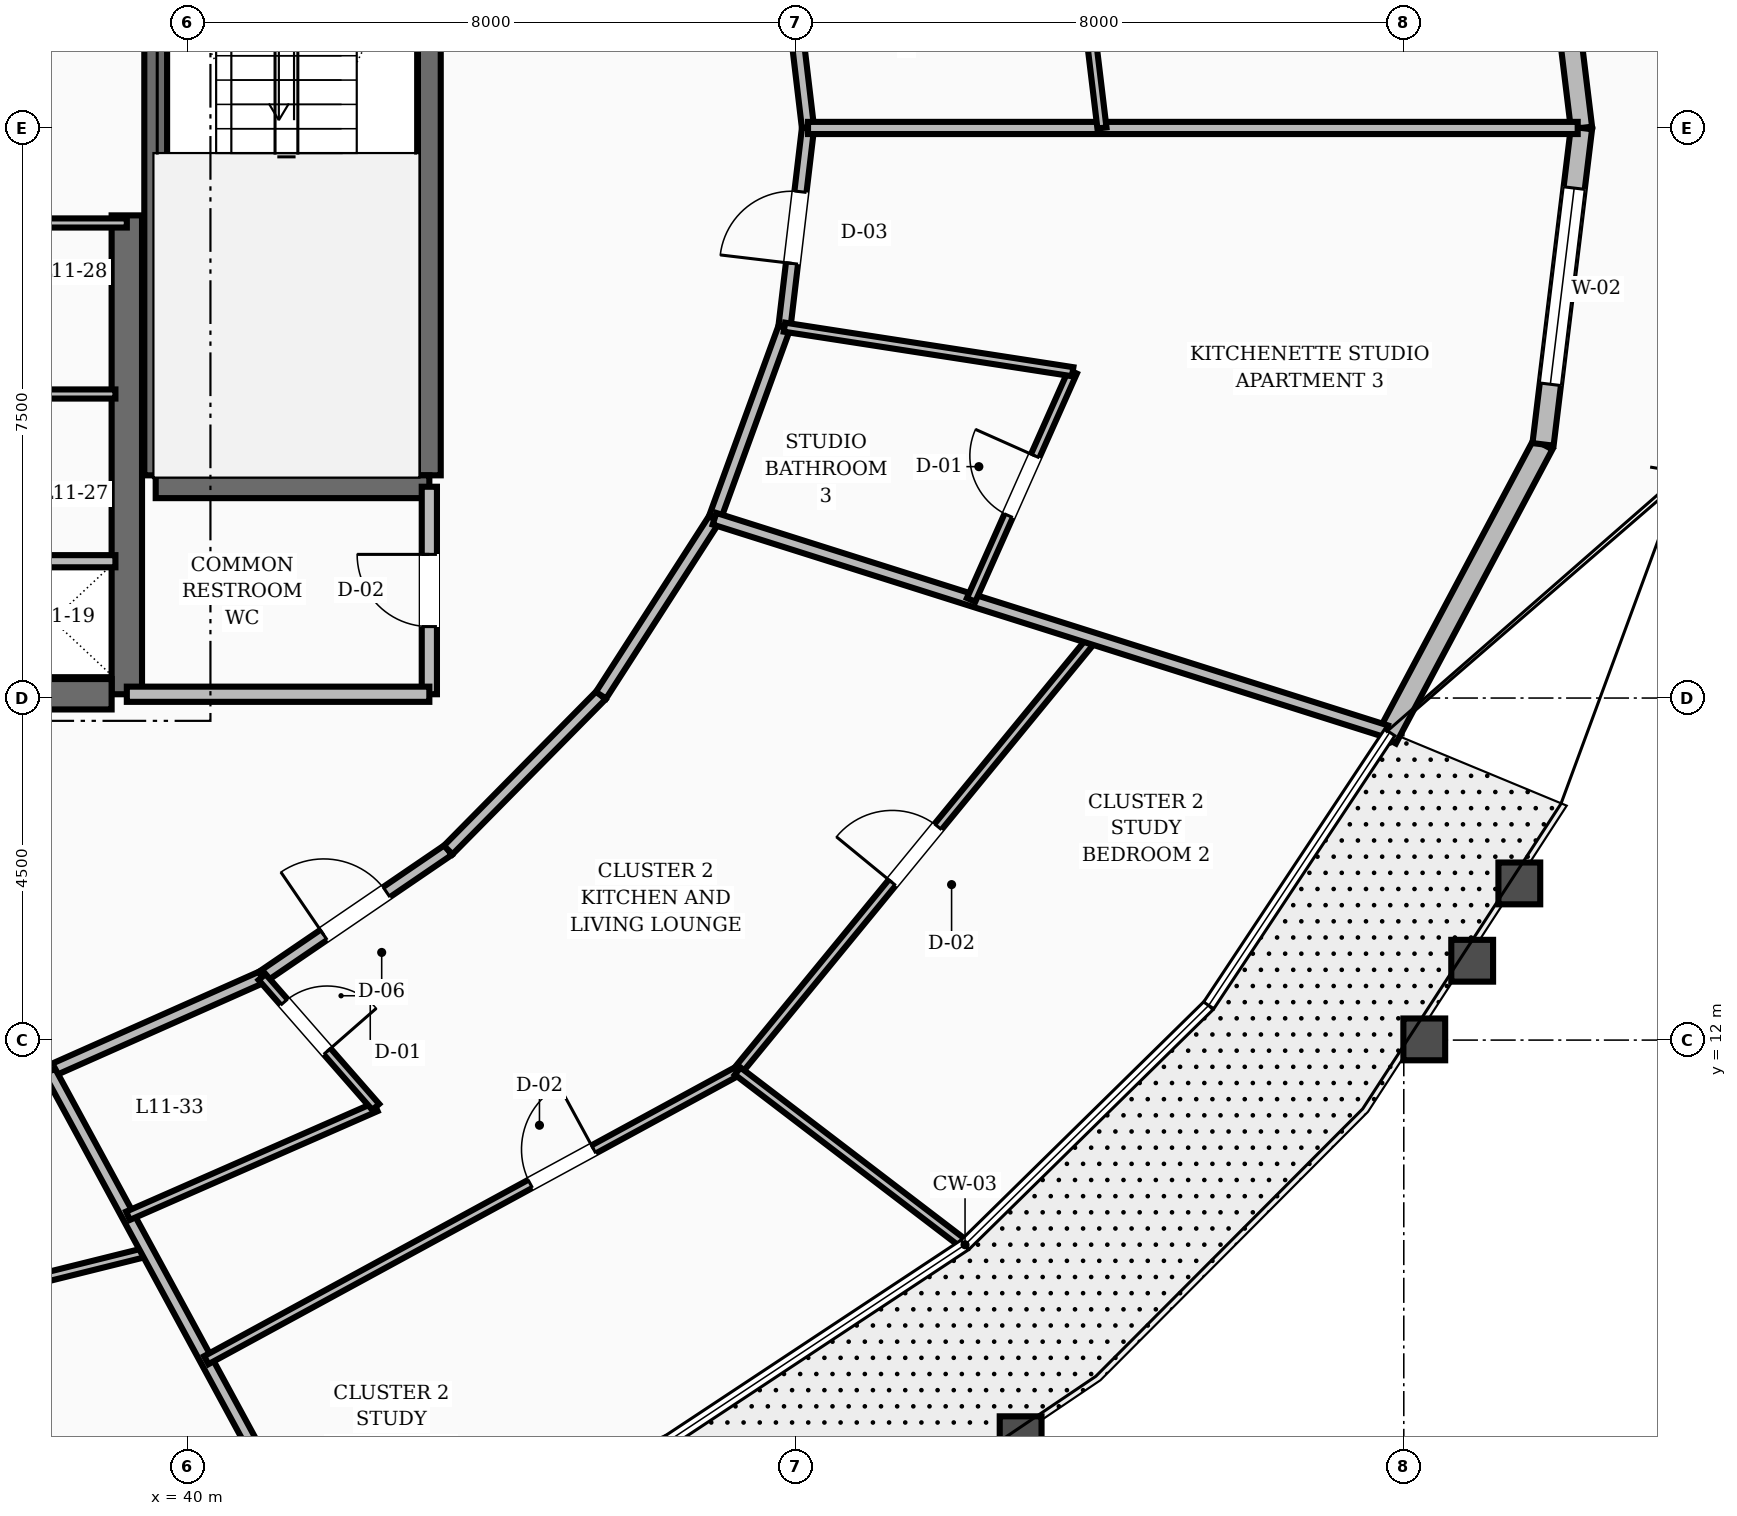
"""IFC4 building model, lengths in metres.
Left out: names, types, materials, properties, quantities, classifications, styles, units other than length and angle.
Written with IfcOpenShell. Run it as: python <this file> out.ifc"""

import sys

from ifc_helpers import new_model, si_unit, direction, frame, frame_2d, origin, place, context, subcontext, project, spatial, rectangle, extrude, element, fill, save


model = new_model("IFC4")
c1 = context("Model", 3, precision=1e-05, world=origin(), true_north=direction((0.0, 1.0)))
c2 = subcontext(c1, "Body", "Model", "MODEL_VIEW")
j1 = project(units=[si_unit("LENGTHUNIT", "METRE"), si_unit("PLANEANGLEUNIT", "RADIAN")], contexts=[c1])
p1 = place(None, origin())
s1 = spatial("IfcSite", under=j1, at=p1, CompositionType="ELEMENT")
p2 = place(p1, origin())
s2 = spatial("IfcBuilding", under=s1, at=p2, CompositionType="ELEMENT")
p3 = place(p2, frame((0.0, 0.0, 48.4)))
s3 = spatial("IfcBuildingStorey", under=s2, at=p3, CompositionType="ELEMENT", Elevation=48.4)
p4 = place(p3, frame((39.2, 16.55, 0.0), z_axis=(0.0, 0.0, 1.0), x_axis=(0.0, 1.0, 0.0)))
e1 = element("IfcWall", 1, at=p4, inside=s3, PredefinedType="SHEAR", context=c2, shape_type="SweptSolid", body=[
    extrude(rectangle(XDim=6.3, YDim=0.4, at=frame_2d((3.15, 0.0))), origin(), (0.0, 0.0, 1.0), 3.6),
])
p5 = place(p3, frame((35.8, 16.55, 0.0), z_axis=(0.0, 0.0, 1.0), x_axis=(1.0, 0.0, 0.0)))
e2 = element("IfcWall", 2, at=p5, inside=s3, PredefinedType="SHEAR", context=c2, shape_type="SweptSolid", body=[
    extrude(rectangle(XDim=3.2, YDim=0.4, at=frame_2d((1.6, 0.0))), origin(), (0.0, 0.0, 1.0), 3.6),
])
p6 = place(p5, frame((0.3, 0.0, 0.0)))
e3 = element("IfcOpeningElement", 3, at=p6, cuts=e2, PredefinedType="OPENING", context=c2, shape_type="SweptSolid", body=[
    extrude(rectangle(XDim=1.1, YDim=2.1, at=frame_2d((0.55, 1.05))), frame((0.0, 0.21, 0.0), z_axis=(0.0, -1.0, 0.0), x_axis=(1.0, 0.0, 0.0)), (0.0, 0.0, 1.0), 0.42),
])
for number, where, z_axis, x_axis in (
    (4, (43.18, 19.43, 0.0), (0.0, 0.0, 1.0), (0.0, 1.0, 0.0)),
    (5, (39.58, 19.43, 0.0), (0.0, 0.0, 1.0), (0.0, 1.0, 0.0)),
):
    element("IfcWall", number, at=place(p3, frame(where, z_axis=z_axis, x_axis=x_axis)), inside=s3, PredefinedType="SHEAR", context=c2, shape_type="SweptSolid", body=[
        extrude(rectangle(XDim=8.74, YDim=0.3, at=frame_2d((4.37, 0.0))), origin(), (0.0, 0.0, 1.0), 3.6),
    ])
p7 = place(p3, frame((39.58, 19.28, 0.0), z_axis=(0.0, 0.0, 1.0), x_axis=(1.0, 0.0, 0.0)))
e6 = element("IfcWall", 6, at=p7, inside=s3, PredefinedType="SHEAR", context=c2, shape_type="SweptSolid", body=[
    extrude(rectangle(XDim=3.6, YDim=0.3, at=frame_2d((1.8, 0.0))), origin(), (0.0, 0.0, 1.0), 3.6),
])
p8 = place(p3, frame((58.338, 24.0, 0.0), z_axis=(0.0, 0.0, 1.0), x_axis=(-0.120687785898, 0.992690514881, 0.0)))
e7 = element("IfcWall", 7, at=p8, inside=s3, PredefinedType="STANDARD", context=c2, shape_type="SweptSolid", body=[
    extrude(rectangle(XDim=4.194, YDim=0.28, at=frame_2d((2.097, 0.0))), origin(), (0.0, 0.0, 1.0), 2.65),
])
p9 = place(p3, frame((55.773, 15.967, 0.0), z_axis=(0.0, 0.0, 1.0), x_axis=(0.469726578594, 0.882811951303, 0.0)))
e8 = element("IfcWall", 8, at=p9, inside=s3, PredefinedType="STANDARD", context=c2, shape_type="SweptSolid", body=[
    extrude(rectangle(XDim=4.384, YDim=0.28, at=frame_2d((2.192, 0.0))), origin(), (0.0, 0.0, 1.0), 2.65),
])
p10 = place(p3, frame((57.832, 19.837, 0.0), z_axis=(0.0, 0.0, 1.0), x_axis=(0.120687785898, 0.992690514881, 0.0)))
e9 = element("IfcWall", 9, at=p10, inside=s3, PredefinedType="STANDARD", context=c2, shape_type="SweptSolid", body=[
    extrude(rectangle(XDim=4.194, YDim=0.28, at=frame_2d((2.097, 0.0))), origin(), (0.0, 0.0, 1.0), 2.65),
])
p11 = place(p10, frame((0.797, 0.0, 0.8)))
e10 = element("IfcOpeningElement", 10, at=p11, cuts=e9, PredefinedType="OPENING", context=c2, shape_type="SweptSolid", body=[
    extrude(rectangle(XDim=2.6, YDim=1.65, at=frame_2d((1.3, 0.825))), frame((0.0, 0.15, 0.0), z_axis=(0.0, -1.0, 0.0), x_axis=(1.0, 0.0, 0.0)), (0.0, 0.0, 1.0), 0.3),
])
p12 = place(p3, frame((43.18, 16.55, 0.0), z_axis=(0.0, 0.0, 1.0), x_axis=(0.0, 1.0, 0.0)))
e11 = element("IfcWall", 11, at=p12, inside=s3, PredefinedType="SOLIDWALL", context=c2, shape_type="SweptSolid", body=[
    extrude(rectangle(XDim=2.73, YDim=0.2, at=frame_2d((1.365, 0.0))), origin(), (0.0, 0.0, 1.0), 2.61),
])
p13 = place(p12, frame((0.89, 0.0, 0.0)))
e12 = element("IfcOpeningElement", 12, at=p13, cuts=e11, PredefinedType="OPENING", context=c2, shape_type="SweptSolid", body=[
    extrude(rectangle(XDim=0.95, YDim=2.1, at=frame_2d((0.475, 1.05))), frame((0.0, 0.11, 0.0), z_axis=(0.0, -1.0, 0.0), x_axis=(1.0, 0.0, 0.0)), (0.0, 0.0, 1.0), 0.22),
])
p14 = place(p3, frame((39.2, 16.55, 0.0), z_axis=(0.0, 0.0, 1.0), x_axis=(1.0, 0.0, 0.0)))
e13 = element("IfcWall", 13, at=p14, inside=s3, PredefinedType="SOLIDWALL", context=c2, shape_type="SweptSolid", body=[
    extrude(rectangle(XDim=3.98, YDim=0.2, at=frame_2d((1.99, 0.0))), origin(), (0.0, 0.0, 1.0), 2.61),
])
p15 = place(p3, frame((37.4, 18.3, 0.0), z_axis=(0.0, 0.0, 1.0), x_axis=(1.0, 0.0, 0.0)))
e14 = element("IfcWall", 14, at=p15, inside=s3, PredefinedType="SOLIDWALL", context=c2, shape_type="SweptSolid", body=[
    extrude(rectangle(XDim=1.65, YDim=0.16, at=frame_2d((0.825, 0.0))), origin(), (0.0, 0.0, 1.0), 2.61),
])
p16 = place(p3, frame((37.4, 22.75, 0.0), z_axis=(0.0, 0.0, 1.0), x_axis=(1.0, 0.0, 0.0)))
e15 = element("IfcWall", 15, at=p16, inside=s3, PredefinedType="PARTITIONING", context=c2, shape_type="SweptSolid", body=[
    extrude(rectangle(XDim=1.8, YDim=0.12, at=frame_2d((0.9, 0.0))), origin(), (0.0, 0.0, 1.0), 2.61),
])
p17 = place(p3, frame((37.4, 20.5, 0.0), z_axis=(0.0, 0.0, 1.0), x_axis=(1.0, 0.0, 0.0)))
e16 = element("IfcWall", 16, at=p17, inside=s3, PredefinedType="PARTITIONING", context=c2, shape_type="SweptSolid", body=[
    extrude(rectangle(XDim=1.65, YDim=0.12, at=frame_2d((0.825, 0.0))), origin(), (0.0, 0.0, 1.0), 2.61),
])
p18 = place(p3, frame((48.162, 24.0, 0.0), z_axis=(0.0, 0.0, 1.0), x_axis=(-0.117667763342, 0.993053018459, 0.0)))
e17 = element("IfcWall", 17, at=p18, inside=s3, PredefinedType="SOLIDWALL", context=c2, shape_type="SweptSolid", body=[
    extrude(rectangle(XDim=2.639, YDim=0.16, at=frame_2d((1.32, 0.0))), origin(), (0.0, 0.0, 1.0), 2.61),
])
p19 = place(p3, frame((38.185, 11.589, 0.0), z_axis=(0.0, 0.0, 1.0), x_axis=(0.913860932409, 0.406027334321, 0.0)))
e18 = element("IfcWall", 18, at=p19, inside=s3, PredefinedType="SOLIDWALL", context=c2, shape_type="SweptSolid", body=[
    extrude(rectangle(XDim=3.058, YDim=0.16, at=frame_2d((1.529, 0.0))), origin(), (0.0, 0.0, 1.0), 2.61),
])
p20 = place(p3, frame((40.979, 12.83, 0.0), z_axis=(0.0, 0.0, 1.0), x_axis=(0.826112340767, 0.563505457323, 0.0)))
e19 = element("IfcWall", 19, at=p20, inside=s3, PredefinedType="SOLIDWALL", context=c2, shape_type="SweptSolid", body=[
    extrude(rectangle(XDim=2.965, YDim=0.16, at=frame_2d((1.482, 0.0))), origin(), (0.0, 0.0, 1.0), 2.61),
])
p21 = place(p20, frame((0.982, 0.0, 0.0)))
e20 = element("IfcOpeningElement", 20, at=p21, cuts=e19, PredefinedType="OPENING", context=c2, shape_type="SweptSolid", body=[
    extrude(rectangle(XDim=1.0, YDim=2.1, at=frame_2d((0.5, 1.05))), frame((0.0, 0.09, 0.0), z_axis=(0.0, -1.0, 0.0), x_axis=(1.0, 0.0, 0.0)), (0.0, 0.0, 1.0), 0.18),
])
p22 = place(p3, frame((43.428, 14.501, 0.0), z_axis=(0.0, 0.0, 1.0), x_axis=(0.702569520063, 0.711615113301, 0.0)))
e21 = element("IfcWall", 21, at=p22, inside=s3, PredefinedType="SOLIDWALL", context=c2, shape_type="SweptSolid", body=[
    extrude(rectangle(XDim=2.861, YDim=0.16, at=frame_2d((1.43, 0.0))), origin(), (0.0, 0.0, 1.0), 2.61),
])
p23 = place(p3, frame((45.438, 16.537, 0.0), z_axis=(0.0, 0.0, 1.0), x_axis=(0.540891657444, 0.841092274907, 0.0)))
e22 = element("IfcWall", 22, at=p23, inside=s3, PredefinedType="SOLIDWALL", context=c2, shape_type="SweptSolid", body=[
    extrude(rectangle(XDim=2.761, YDim=0.16, at=frame_2d((1.38, 0.0))), origin(), (0.0, 0.0, 1.0), 2.61),
])
p24 = place(p3, frame((46.932, 18.859, 0.0), z_axis=(0.0, 0.0, 1.0), x_axis=(0.342882618672, 0.939378257047, 0.0)))
e23 = element("IfcWall", 23, at=p24, inside=s3, PredefinedType="SOLIDWALL", context=c2, shape_type="SweptSolid", body=[
    extrude(rectangle(XDim=2.683, YDim=0.16, at=frame_2d((1.341, 0.0))), origin(), (0.0, 0.0, 1.0), 2.61),
])
p25 = place(p3, frame((47.852, 21.379, 0.0), z_axis=(0.0, 0.0, 1.0), x_axis=(0.117667763342, 0.993053018459, 0.0)))
e24 = element("IfcWall", 24, at=p25, inside=s3, PredefinedType="SOLIDWALL", context=c2, shape_type="SweptSolid", body=[
    extrude(rectangle(XDim=2.639, YDim=0.16, at=frame_2d((1.32, 0.0))), origin(), (0.0, 0.0, 1.0), 2.61),
])
p26 = place(p25, frame((0.844, 0.0, 0.0)))
e25 = element("IfcOpeningElement", 25, at=p26, cuts=e24, PredefinedType="OPENING", context=c2, shape_type="SweptSolid", body=[
    extrude(rectangle(XDim=0.95, YDim=2.1, at=frame_2d((0.475, 1.05))), frame((0.0, 0.09, 0.0), z_axis=(0.0, -1.0, 0.0), x_axis=(1.0, 0.0, 0.0)), (0.0, 0.0, 1.0), 0.18),
])
p27 = place(p3, frame((35.81, 8.303, 0.0), z_axis=(0.0, 0.0, 1.0), x_axis=(0.970449874904, 0.241302797952, 0.0)))
e26 = element("IfcWall", 26, at=p27, inside=s3, PredefinedType="PARTITIONING", context=c2, shape_type="SweptSolid", body=[
    extrude(rectangle(XDim=3.775, YDim=0.12, at=frame_2d((1.887, 0.0))), origin(), (0.0, 0.0, 1.0), 2.61),
])
p28 = place(p3, frame((38.185, 11.589, 0.0), z_axis=(0.0, 0.0, 1.0), x_axis=(0.476776382482, -0.87902461917, 0.0)))
e27 = element("IfcWall", 27, at=p28, inside=s3, PredefinedType="SOLIDWALL", context=c2, shape_type="SweptSolid", body=[
    extrude(rectangle(XDim=7.669, YDim=0.16, at=frame_2d((3.834, 0.0))), origin(), (0.0, 0.0, 1.0), 2.61),
])
p29 = place(p3, frame((39.215, 9.689, 0.0), z_axis=(0.0, 0.0, 1.0), x_axis=(0.915615092878, 0.40205596836, 0.0)))
e28 = element("IfcWall", 28, at=p29, inside=s3, PredefinedType="PARTITIONING", context=c2, shape_type="SweptSolid", body=[
    extrude(rectangle(XDim=3.56, YDim=0.12, at=frame_2d((1.78, 0.0))), origin(), (0.0, 0.0, 1.0), 2.61),
])
p30 = place(p3, frame((40.979, 12.83, 0.0), z_axis=(0.0, 0.0, 1.0), x_axis=(0.658474178061, -0.752603319703, 0.0)))
e29 = element("IfcWall", 29, at=p30, inside=s3, PredefinedType="PARTITIONING", context=c2, shape_type="SweptSolid", body=[
    extrude(rectangle(XDim=2.272, YDim=0.12, at=frame_2d((1.136, 0.0))), origin(), (0.0, 0.0, 1.0), 2.61),
])
p31 = place(p30, frame((0.44, 0.0, 0.0)))
e30 = element("IfcOpeningElement", 30, at=p31, cuts=e29, PredefinedType="OPENING", context=c2, shape_type="SweptSolid", body=[
    extrude(rectangle(XDim=0.86, YDim=2.1, at=frame_2d((0.43, 1.05))), frame((0.0, 0.07, 0.0), z_axis=(0.0, -1.0, 0.0), x_axis=(1.0, 0.0, 0.0)), (0.0, 0.0, 1.0), 0.14),
])
p32 = place(p3, frame((40.246, 7.789, 0.0), z_axis=(0.0, 0.0, 1.0), x_axis=(0.8783980486, 0.477929773309, 0.0)))
e31 = element("IfcWall", 31, at=p32, inside=s3, PredefinedType="PARTITIONING", context=c2, shape_type="SweptSolid", body=[
    extrude(rectangle(XDim=7.958, YDim=0.12, at=frame_2d((3.979, 0.0))), origin(), (0.0, 0.0, 1.0), 2.61),
])
p33 = place(p32, frame((4.852, 0.0, 0.0)))
e32 = element("IfcOpeningElement", 32, at=p33, cuts=e31, PredefinedType="OPENING", context=c2, shape_type="SweptSolid", body=[
    extrude(rectangle(XDim=0.95, YDim=2.1, at=frame_2d((0.475, 1.05))), frame((0.0, 0.07, 0.0), z_axis=(0.0, -1.0, 0.0), x_axis=(1.0, 0.0, 0.0)), (0.0, 0.0, 1.0), 0.14),
])
p34 = place(p3, frame((47.236, 11.593, 0.0), z_axis=(0.0, 0.0, 1.0), x_axis=(0.634298828671, 0.773087961326, 0.0)))
e33 = element("IfcWall", 33, at=p34, inside=s3, PredefinedType="PARTITIONING", context=c2, shape_type="SweptSolid", body=[
    extrude(rectangle(XDim=7.364, YDim=0.12, at=frame_2d((3.682, 0.0))), origin(), (0.0, 0.0, 1.0), 2.61),
])
p35 = place(p34, frame((3.207, 0.0, 0.0)))
e34 = element("IfcOpeningElement", 34, at=p35, cuts=e33, PredefinedType="OPENING", context=c2, shape_type="SweptSolid", body=[
    extrude(rectangle(XDim=0.95, YDim=2.1, at=frame_2d((0.475, 1.05))), frame((0.0, 0.07, 0.0), z_axis=(0.0, -1.0, 0.0), x_axis=(1.0, 0.0, 0.0)), (0.0, 0.0, 1.0), 0.14),
])
p36 = place(p3, frame((47.236, 11.593, 0.0), z_axis=(0.0, 0.0, 1.0), x_axis=(0.794708437358, -0.606991350509, 0.0)))
e35 = element("IfcWall", 35, at=p36, inside=s3, PredefinedType="PARTITIONING", context=c2, shape_type="SweptSolid", body=[
    extrude(rectangle(XDim=3.714, YDim=0.12, at=frame_2d((1.857, 0.0))), origin(), (0.0, 0.0, 1.0), 2.61),
])
p37 = place(p3, frame((46.932, 18.859, 0.0), z_axis=(0.0, 0.0, 1.0), x_axis=(0.953436442202, -0.301594016322, 0.0)))
e36 = element("IfcWall", 36, at=p37, inside=s3, PredefinedType="SOLIDWALL", context=c2, shape_type="SweptSolid", body=[
    extrude(rectangle(XDim=9.268, YDim=0.16, at=frame_2d((4.634, 0.0))), origin(), (0.0, 0.0, 1.0), 2.61),
])
p38 = place(p3, frame((50.308, 17.791, 0.0), z_axis=(0.0, 0.0, 1.0), x_axis=(0.406676057564, 0.913572429643, 0.0)))
e37 = element("IfcWall", 37, at=p38, inside=s3, PredefinedType="PARTITIONING", context=c2, shape_type="SweptSolid", body=[
    extrude(rectangle(XDim=3.286, YDim=0.12, at=frame_2d((1.643, 0.0))), origin(), (0.0, 0.0, 1.0), 2.61),
])
p39 = place(p38, frame((1.213, 0.0, 0.0)))
e38 = element("IfcOpeningElement", 38, at=p39, cuts=e37, PredefinedType="OPENING", context=c2, shape_type="SweptSolid", body=[
    extrude(rectangle(XDim=0.86, YDim=2.1, at=frame_2d((0.43, 1.05))), frame((0.0, 0.07, 0.0), z_axis=(0.0, -1.0, 0.0), x_axis=(1.0, 0.0, 0.0)), (0.0, 0.0, 1.0), 0.14),
])
p40 = place(p3, frame((47.852, 21.379, 0.0), z_axis=(0.0, 0.0, 1.0), x_axis=(0.988274411208, -0.152688205671, 0.0)))
e39 = element("IfcWall", 39, at=p40, inside=s3, PredefinedType="PARTITIONING", context=c2, shape_type="SweptSolid", body=[
    extrude(rectangle(XDim=3.837, YDim=0.12, at=frame_2d((1.919, 0.0))), origin(), (0.0, 0.0, 1.0), 2.61),
])
p41 = place(p3, frame((48.162, 24.0, 0.0), z_axis=(0.0, 0.0, 1.0), x_axis=(1.0, 0.0, 0.0)))
e40 = element("IfcWall", 40, at=p41, inside=s3, PredefinedType="SOLIDWALL", context=c2, shape_type="SweptSolid", body=[
    extrude(rectangle(XDim=10.126, YDim=0.16, at=frame_2d((5.063, 0.0))), origin(), (0.0, 0.0, 1.0), 2.61),
])
p42 = place(p3, frame((52.029, 24.0, 0.0), z_axis=(0.0, 0.0, 1.0), x_axis=(-0.119130317154, 0.992878626789, 0.0)))
e41 = element("IfcWall", 41, at=p42, inside=s3, PredefinedType="PARTITIONING", context=c2, shape_type="SweptSolid", body=[
    extrude(rectangle(XDim=3.23, YDim=0.12, at=frame_2d((1.615, 0.0))), origin(), (0.0, 0.0, 1.0), 2.61),
])
p43 = place(p42, frame((1.185, 0.0, 0.0)))
e42 = element("IfcOpeningElement", 42, at=p43, cuts=e41, PredefinedType="OPENING", context=c2, shape_type="SweptSolid", body=[
    extrude(rectangle(XDim=0.86, YDim=2.1, at=frame_2d((0.43, 1.05))), frame((0.0, 0.07, 0.0), z_axis=(0.0, -1.0, 0.0), x_axis=(1.0, 0.0, 0.0)), (0.0, 0.0, 1.0), 0.14),
])
p44 = place(p11, origin())
e43 = element("IfcWindow", 43, at=p44, inside=s3, PartitioningType="SINGLE_PANEL", PredefinedType="WINDOW", context=c2, shape_type="SweptSolid", body=[
    extrude(rectangle(XDim=2.6, YDim=1.65, at=frame_2d((1.3, 0.825))), frame((0.0, 0.03, 0.0), z_axis=(0.0, -1.0, 0.0), x_axis=(1.0, 0.0, 0.0)), (0.0, 0.0, 1.0), 0.06),
])
fill(e10, e43)
p45 = place(p13, origin())
e44 = element("IfcDoor", 44, at=p45, inside=s3, OperationType="SINGLE_SWING_RIGHT", PredefinedType="DOOR", context=c2, shape_type="SweptSolid", body=[
    extrude(rectangle(XDim=0.95, YDim=2.1, at=frame_2d((0.475, 1.05))), frame((0.0, 0.025, 0.0), z_axis=(0.0, -1.0, 0.0), x_axis=(1.0, 0.0, 0.0)), (0.0, 0.0, 1.0), 0.05),
])
fill(e12, e44)
p46 = place(p31, origin())
e45 = element("IfcDoor", 45, at=p46, inside=s3, OperationType="SINGLE_SWING_RIGHT", PredefinedType="DOOR", context=c2, shape_type="SweptSolid", body=[
    extrude(rectangle(XDim=0.86, YDim=2.1, at=frame_2d((0.43, 1.05))), frame((0.0, 0.025, 0.0), z_axis=(0.0, -1.0, 0.0), x_axis=(1.0, 0.0, 0.0)), (0.0, 0.0, 1.0), 0.05),
])
fill(e30, e45)
p47 = place(p21, origin())
e46 = element("IfcDoor", 46, at=p47, inside=s3, OperationType="SINGLE_SWING_LEFT", PredefinedType="DOOR", context=c2, shape_type="SweptSolid", body=[
    extrude(rectangle(XDim=1.0, YDim=2.1, at=frame_2d((0.5, 1.05))), frame((0.0, 0.025, 0.0), z_axis=(0.0, -1.0, 0.0), x_axis=(1.0, 0.0, 0.0)), (0.0, 0.0, 1.0), 0.05),
])
fill(e20, e46)
p48 = place(p33, origin())
e47 = element("IfcDoor", 47, at=p48, inside=s3, OperationType="SINGLE_SWING_RIGHT", PredefinedType="DOOR", context=c2, shape_type="SweptSolid", body=[
    extrude(rectangle(XDim=0.95, YDim=2.1, at=frame_2d((0.475, 1.05))), frame((0.0, 0.025, 0.0), z_axis=(0.0, -1.0, 0.0), x_axis=(1.0, 0.0, 0.0)), (0.0, 0.0, 1.0), 0.05),
])
fill(e32, e47)
p49 = place(p35, origin())
e48 = element("IfcDoor", 48, at=p49, inside=s3, OperationType="SINGLE_SWING_LEFT", PredefinedType="DOOR", context=c2, shape_type="SweptSolid", body=[
    extrude(rectangle(XDim=0.95, YDim=2.1, at=frame_2d((0.475, 1.05))), frame((0.0, 0.025, 0.0), z_axis=(0.0, -1.0, 0.0), x_axis=(1.0, 0.0, 0.0)), (0.0, 0.0, 1.0), 0.05),
])
fill(e34, e48)
p50 = place(p39, origin())
e49 = element("IfcDoor", 49, at=p50, inside=s3, OperationType="SINGLE_SWING_RIGHT", PredefinedType="DOOR", context=c2, shape_type="SweptSolid", body=[
    extrude(rectangle(XDim=0.86, YDim=2.1, at=frame_2d((0.43, 1.05))), frame((0.0, 0.025, 0.0), z_axis=(0.0, -1.0, 0.0), x_axis=(1.0, 0.0, 0.0)), (0.0, 0.0, 1.0), 0.05),
])
fill(e38, e49)
p51 = place(p26, origin())
e50 = element("IfcDoor", 50, at=p51, inside=s3, OperationType="SINGLE_SWING_LEFT", PredefinedType="DOOR", context=c2, shape_type="SweptSolid", body=[
    extrude(rectangle(XDim=0.95, YDim=2.1, at=frame_2d((0.475, 1.05))), frame((0.0, 0.025, 0.0), z_axis=(0.0, -1.0, 0.0), x_axis=(1.0, 0.0, 0.0)), (0.0, 0.0, 1.0), 0.05),
])
fill(e25, e50)
save(model, sys.argv[1])
